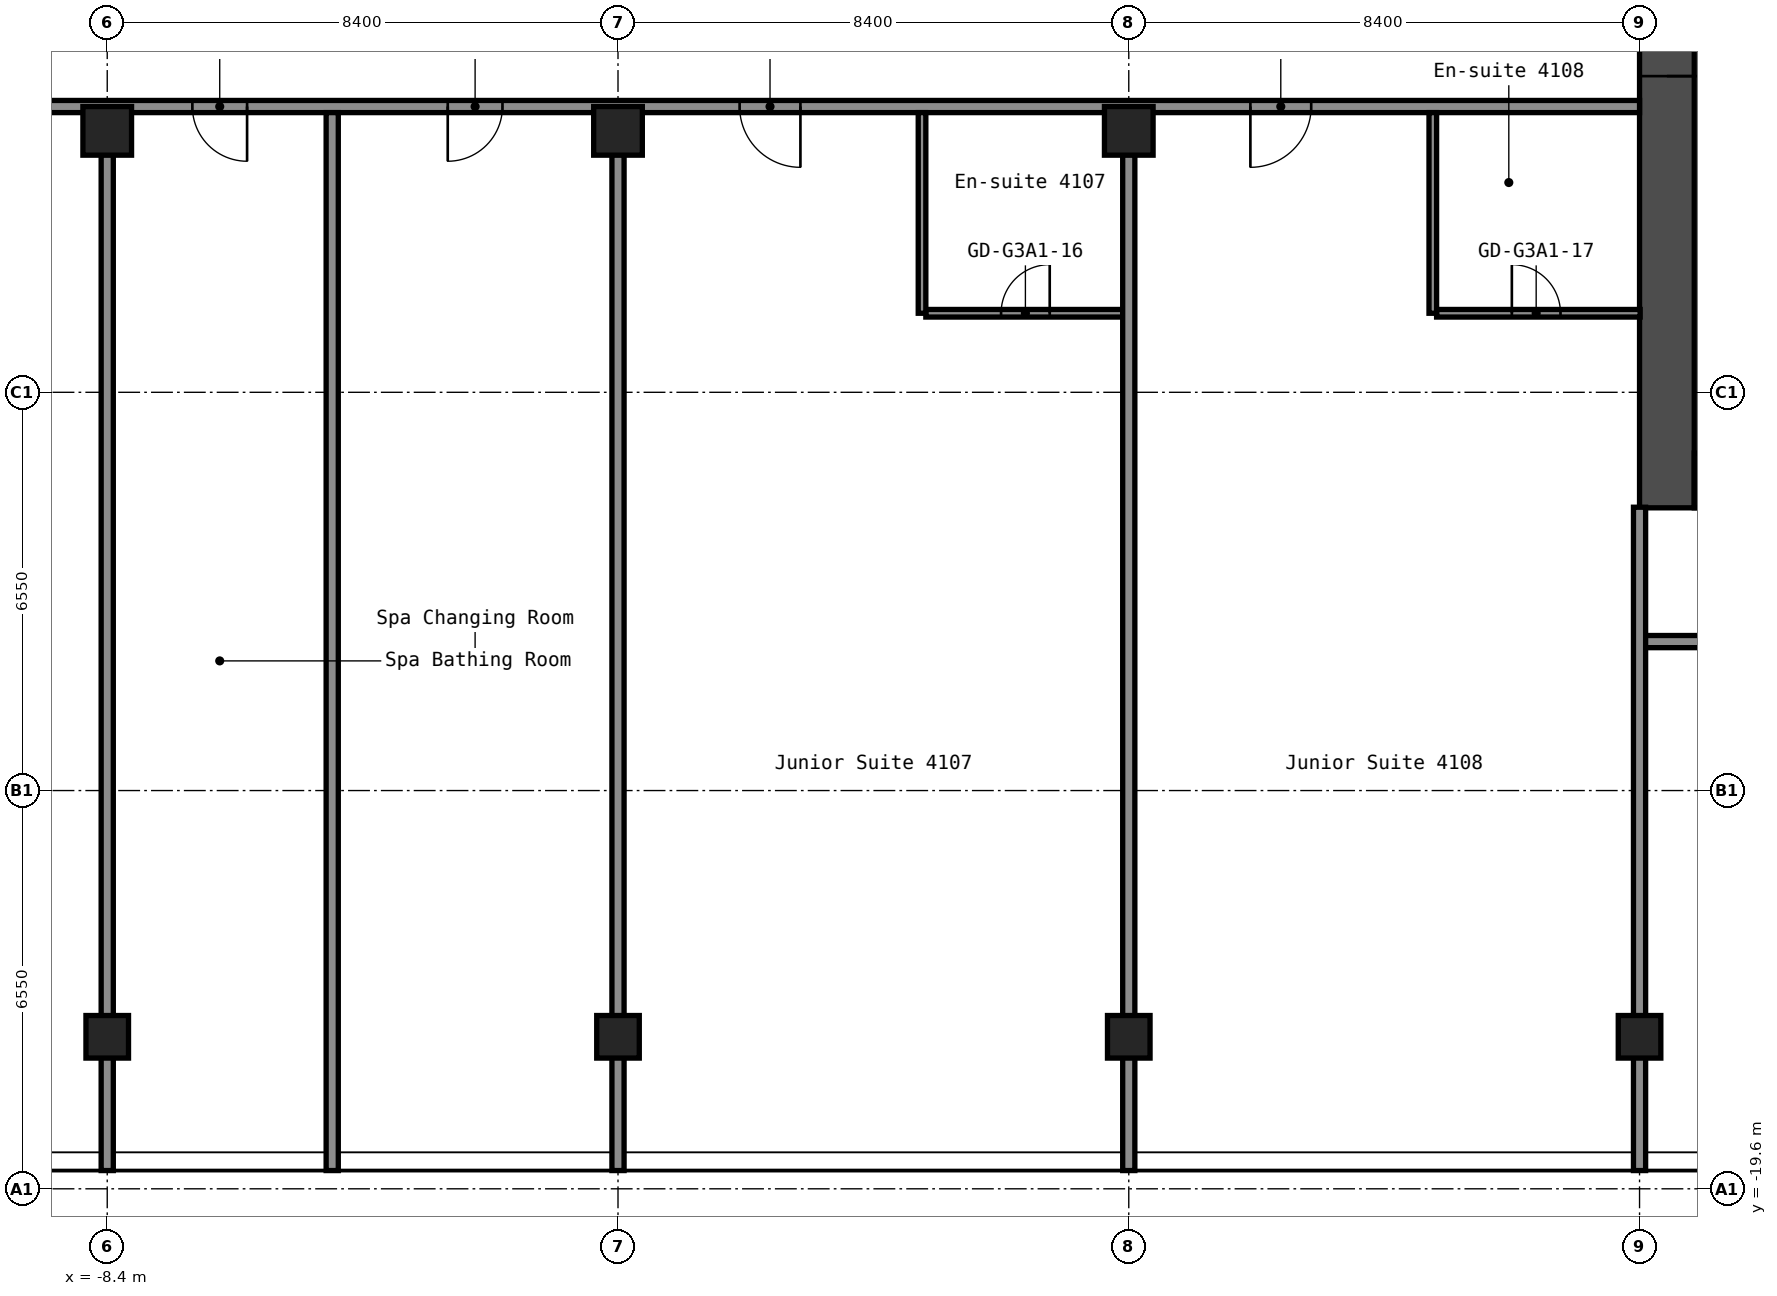
"""IFC4 building model, lengths in metres.
Left out: names, types, materials, properties, quantities, classifications, styles, units other than length and angle.
Written with IfcOpenShell. Run it as: python <this file> out.ifc"""

import sys

from ifc_helpers import new_model, si_unit, direction, frame, frame_2d, origin, origin_2d, place, context, subcontext, project, spatial, rectangle, hollow_rectangle, extrude, element, fill, save


model = new_model("IFC4")
c1 = context("Model", 3, precision=1e-05, world=origin(), true_north=direction((0.0, 1.0)))
c2 = subcontext(c1, "Body", "Model", "MODEL_VIEW")
j1 = project(units=[si_unit("LENGTHUNIT", "METRE"), si_unit("PLANEANGLEUNIT", "RADIAN")], contexts=[c1])
p1 = place(None, origin())
s1 = spatial("IfcSite", under=j1, at=p1, CompositionType="ELEMENT")
p2 = place(p1, origin())
s2 = spatial("IfcBuilding", under=s1, at=p2, CompositionType="ELEMENT")
p3 = place(p2, frame((0.0, 0.0, 147.0)))
s3 = spatial("IfcBuildingStorey", under=s2, at=p3, CompositionType="ELEMENT", Elevation=147.0)
p4 = place(p3, frame((-8.4, -17.1, 0.0), z_axis=(0.0, 0.0, 1.0), x_axis=(1.0, 0.0, 0.0)))
e1 = element("IfcColumn", 1, at=p4, inside=s3, PredefinedType="COLUMN", context=c2, shape_type="SweptSolid", body=[
    extrude(hollow_rectangle(XDim=0.7, YDim=0.7, WallThickness=0.028, at=origin_2d()), origin(), (0.0, 0.0, 1.0), 2.75),
])
p5 = place(p3, frame((-8.4, -2.2, 0.0), z_axis=(0.0, 0.0, 1.0), x_axis=(1.0, 0.0, 0.0)))
e2 = element("IfcColumn", 2, at=p5, inside=s3, PredefinedType="COLUMN", context=c2, shape_type="SweptSolid", body=[
    extrude(hollow_rectangle(XDim=0.8, YDim=0.8, WallThickness=0.032, at=origin_2d()), origin(), (0.0, 0.0, 1.0), 2.75),
])
p6 = place(p3, frame((0.0, -17.1, 0.0), z_axis=(0.0, 0.0, 1.0), x_axis=(1.0, 0.0, 0.0)))
e3 = element("IfcColumn", 3, at=p6, inside=s3, PredefinedType="COLUMN", context=c2, shape_type="SweptSolid", body=[
    extrude(hollow_rectangle(XDim=0.7, YDim=0.7, WallThickness=0.028, at=origin_2d()), origin(), (0.0, 0.0, 1.0), 2.75),
])
p7 = place(p3, frame((0.0, -2.2, 0.0), z_axis=(0.0, 0.0, 1.0), x_axis=(1.0, 0.0, 0.0)))
e4 = element("IfcColumn", 4, at=p7, inside=s3, PredefinedType="COLUMN", context=c2, shape_type="SweptSolid", body=[
    extrude(hollow_rectangle(XDim=0.8, YDim=0.8, WallThickness=0.032, at=origin_2d()), origin(), (0.0, 0.0, 1.0), 2.75),
])
p8 = place(p3, frame((8.4, -17.1, 0.0), z_axis=(0.0, 0.0, 1.0), x_axis=(1.0, 0.0, 0.0)))
e5 = element("IfcColumn", 5, at=p8, inside=s3, PredefinedType="COLUMN", context=c2, shape_type="SweptSolid", body=[
    extrude(hollow_rectangle(XDim=0.7, YDim=0.7, WallThickness=0.028, at=origin_2d()), origin(), (0.0, 0.0, 1.0), 2.75),
])
p9 = place(p3, frame((8.4, -2.2, 0.0), z_axis=(0.0, 0.0, 1.0), x_axis=(1.0, 0.0, 0.0)))
e6 = element("IfcColumn", 6, at=p9, inside=s3, PredefinedType="COLUMN", context=c2, shape_type="SweptSolid", body=[
    extrude(hollow_rectangle(XDim=0.8, YDim=0.8, WallThickness=0.032, at=origin_2d()), origin(), (0.0, 0.0, 1.0), 2.75),
])
p10 = place(p3, frame((16.8, -17.1, 0.0), z_axis=(0.0, 0.0, 1.0), x_axis=(1.0, 0.0, 0.0)))
e7 = element("IfcColumn", 7, at=p10, inside=s3, PredefinedType="COLUMN", context=c2, shape_type="SweptSolid", body=[
    extrude(hollow_rectangle(XDim=0.7, YDim=0.7, WallThickness=0.028, at=origin_2d()), origin(), (0.0, 0.0, 1.0), 2.75),
])
p11 = place(p3, frame((17.25, -8.4, 0.0), z_axis=(0.0, 0.0, 1.0), x_axis=(0.0, 1.0, 0.0)))
e8 = element("IfcWall", 8, at=p11, inside=s3, PredefinedType="SHEAR", context=c2, shape_type="SweptSolid", body=[
    extrude(rectangle(XDim=16.8, YDim=0.9, at=frame_2d((8.4, 0.0))), origin(), (0.0, 0.0, 1.0), 2.75),
])
p12 = place(p11, frame((7.1, 0.0, 0.0)))
e9 = element("IfcOpeningElement", 9, at=p12, cuts=e8, PredefinedType="OPENING", context=c2, shape_type="SweptSolid", body=[
    extrude(rectangle(XDim=1.6, YDim=2.1, at=frame_2d((0.8, 1.05))), frame((0.0, 0.46, 0.0), z_axis=(0.0, -1.0, 0.0), x_axis=(1.0, 0.0, 0.0)), (0.0, 0.0, 1.0), 0.92),
])
p13 = place(p3, frame((17.7, -7.95, 0.0), z_axis=(0.0, 0.0, 1.0), x_axis=(1.0, 0.0, 0.0)))
e10 = element("IfcWall", 10, at=p13, inside=s3, PredefinedType="SHEAR", context=c2, shape_type="SweptSolid", body=[
    extrude(rectangle(XDim=15.0, YDim=0.9, at=frame_2d((7.5, 0.0))), origin(), (0.0, 0.0, 1.0), 2.75),
])
p14 = place(p13, frame((2.55, 0.0, 0.0)))
e11 = element("IfcOpeningElement", 11, at=p14, cuts=e10, PredefinedType="OPENING", context=c2, shape_type="SweptSolid", body=[
    extrude(rectangle(XDim=1.0, YDim=2.1, at=frame_2d((0.5, 1.05))), frame((0.0, 0.46, 0.0), z_axis=(0.0, -1.0, 0.0), x_axis=(1.0, 0.0, 0.0)), (0.0, 0.0, 1.0), 0.92),
])
p15 = place(p3, frame((16.8, -10.6, 0.0), z_axis=(0.0, 0.0, 1.0), x_axis=(1.0, 0.0, 0.0)))
e12 = element("IfcWall", 12, at=p15, inside=s3, PredefinedType="PARTITIONING", context=c2, shape_type="SweptSolid", body=[
    extrude(rectangle(XDim=25.9, YDim=0.2, at=frame_2d((12.95, 0.0))), origin(), (0.0, 0.0, 1.0), 2.75),
])
p16 = place(p15, frame((2.0, 0.0, 0.0)))
e13 = element("IfcOpeningElement", 13, at=p16, cuts=e12, PredefinedType="OPENING", context=c2, shape_type="SweptSolid", body=[
    extrude(rectangle(XDim=1.0, YDim=2.1, at=frame_2d((0.5, 1.05))), frame((0.0, 0.11, 0.0), z_axis=(0.0, -1.0, 0.0), x_axis=(1.0, 0.0, 0.0)), (0.0, 0.0, 1.0), 0.22),
])
p17 = place(p15, frame((10.4, 0.0, 0.0)))
e14 = element("IfcOpeningElement", 14, at=p17, cuts=e12, PredefinedType="OPENING", context=c2, shape_type="SweptSolid", body=[
    extrude(rectangle(XDim=1.0, YDim=2.1, at=frame_2d((0.5, 1.05))), frame((0.0, 0.11, 0.0), z_axis=(0.0, -1.0, 0.0), x_axis=(1.0, 0.0, 0.0)), (0.0, 0.0, 1.0), 0.22),
])
p18 = place(p15, frame((22.4, 0.0, 0.0)))
e15 = element("IfcOpeningElement", 15, at=p18, cuts=e12, PredefinedType="OPENING", context=c2, shape_type="SweptSolid", body=[
    extrude(rectangle(XDim=1.0, YDim=2.1, at=frame_2d((0.5, 1.05))), frame((0.0, 0.11, 0.0), z_axis=(0.0, -1.0, 0.0), x_axis=(1.0, 0.0, 0.0)), (0.0, 0.0, 1.0), 0.22),
])
p19 = place(p3, frame((5.062, -5.2, 0.0), z_axis=(0.0, 0.0, 1.0), x_axis=(1.0, 0.0, 0.0)))
e16 = element("IfcWall", 16, at=p19, inside=s3, PredefinedType="PARTITIONING", context=c2, shape_type="SweptSolid", body=[
    extrude(rectangle(XDim=3.238, YDim=0.125, at=frame_2d((1.619, 0.0))), origin(), (0.0, 0.0, 1.0), 2.75),
])
p20 = place(p19, frame((1.238, 0.0, 0.0)))
e17 = element("IfcOpeningElement", 17, at=p20, cuts=e16, PredefinedType="OPENING", context=c2, shape_type="SweptSolid", body=[
    extrude(rectangle(XDim=0.8, YDim=2.1, at=frame_2d((0.4, 1.05))), frame((0.0, 0.073, 0.0), z_axis=(0.0, -1.0, 0.0), x_axis=(1.0, 0.0, 0.0)), (0.0, 0.0, 1.0), 0.145),
])
p21 = place(p3, frame((13.462, -5.2, 0.0), z_axis=(0.0, 0.0, 1.0), x_axis=(1.0, 0.0, 0.0)))
e18 = element("IfcWall", 18, at=p21, inside=s3, PredefinedType="PARTITIONING", context=c2, shape_type="SweptSolid", body=[
    extrude(rectangle(XDim=3.348, YDim=0.125, at=frame_2d((1.674, 0.0))), origin(), (0.0, 0.0, 1.0), 2.75),
])
p22 = place(p21, frame((1.238, 0.0, 0.0)))
e19 = element("IfcOpeningElement", 19, at=p22, cuts=e18, PredefinedType="OPENING", context=c2, shape_type="SweptSolid", body=[
    extrude(rectangle(XDim=0.8, YDim=2.1, at=frame_2d((0.4, 1.05))), frame((0.0, 0.073, 0.0), z_axis=(0.0, -1.0, 0.0), x_axis=(1.0, 0.0, 0.0)), (0.0, 0.0, 1.0), 0.145),
])
p23 = place(p3, frame((-16.8, -1.8, 0.0), z_axis=(0.0, 0.0, 1.0), x_axis=(1.0, 0.0, 0.0)))
e20 = element("IfcWall", 20, at=p23, inside=s3, PredefinedType="PARTITIONING", context=c2, shape_type="SweptSolid", body=[
    extrude(rectangle(XDim=33.6, YDim=0.2, at=frame_2d((16.8, 0.0))), origin(), (0.0, 0.0, 1.0), 2.75),
])
p24 = place(p23, frame((5.5, 0.0, 0.0)))
e21 = element("IfcOpeningElement", 21, at=p24, cuts=e20, PredefinedType="OPENING", context=c2, shape_type="SweptSolid", body=[
    extrude(rectangle(XDim=1.0, YDim=2.1, at=frame_2d((0.5, 1.05))), frame((0.0, 0.11, 0.0), z_axis=(0.0, -1.0, 0.0), x_axis=(1.0, 0.0, 0.0)), (0.0, 0.0, 1.0), 0.22),
])
p25 = place(p23, frame((9.8, 0.0, 0.0)))
e22 = element("IfcOpeningElement", 22, at=p25, cuts=e20, PredefinedType="OPENING", context=c2, shape_type="SweptSolid", body=[
    extrude(rectangle(XDim=0.9, YDim=2.1, at=frame_2d((0.45, 1.05))), frame((0.0, 0.11, 0.0), z_axis=(0.0, -1.0, 0.0), x_axis=(1.0, 0.0, 0.0)), (0.0, 0.0, 1.0), 0.22),
])
p26 = place(p23, frame((14.0, 0.0, 0.0)))
e23 = element("IfcOpeningElement", 23, at=p26, cuts=e20, PredefinedType="OPENING", context=c2, shape_type="SweptSolid", body=[
    extrude(rectangle(XDim=0.9, YDim=2.1, at=frame_2d((0.45, 1.05))), frame((0.0, 0.11, 0.0), z_axis=(0.0, -1.0, 0.0), x_axis=(1.0, 0.0, 0.0)), (0.0, 0.0, 1.0), 0.22),
])
p27 = place(p23, frame((18.8, 0.0, 0.0)))
e24 = element("IfcOpeningElement", 24, at=p27, cuts=e20, PredefinedType="OPENING", context=c2, shape_type="SweptSolid", body=[
    extrude(rectangle(XDim=1.0, YDim=2.1, at=frame_2d((0.5, 1.05))), frame((0.0, 0.11, 0.0), z_axis=(0.0, -1.0, 0.0), x_axis=(1.0, 0.0, 0.0)), (0.0, 0.0, 1.0), 0.22),
])
p28 = place(p23, frame((27.2, 0.0, 0.0)))
e25 = element("IfcOpeningElement", 25, at=p28, cuts=e20, PredefinedType="OPENING", context=c2, shape_type="SweptSolid", body=[
    extrude(rectangle(XDim=1.0, YDim=2.1, at=frame_2d((0.5, 1.05))), frame((0.0, 0.11, 0.0), z_axis=(0.0, -1.0, 0.0), x_axis=(1.0, 0.0, 0.0)), (0.0, 0.0, 1.0), 0.22),
])
p29 = place(p3, frame((-8.4, -19.3, 0.0), z_axis=(0.0, 0.0, 1.0), x_axis=(0.0, 1.0, 0.0)))
e26 = element("IfcWall", 26, at=p29, inside=s3, PredefinedType="PARTITIONING", context=c2, shape_type="SweptSolid", body=[
    extrude(rectangle(XDim=16.71, YDim=0.2, at=frame_2d((8.355, 0.0))), origin(), (0.0, 0.0, 1.0), 2.75),
])
p30 = place(p3, frame((-4.7, -19.3, 0.0), z_axis=(0.0, 0.0, 1.0), x_axis=(0.0, 1.0, 0.0)))
e27 = element("IfcWall", 27, at=p30, inside=s3, PredefinedType="PARTITIONING", context=c2, shape_type="SweptSolid", body=[
    extrude(rectangle(XDim=17.4, YDim=0.2, at=frame_2d((8.7, 0.0))), origin(), (0.0, 0.0, 1.0), 2.75),
])
p31 = place(p3, frame((0.0, -19.3, 0.0), z_axis=(0.0, 0.0, 1.0), x_axis=(0.0, 1.0, 0.0)))
e28 = element("IfcWall", 28, at=p31, inside=s3, PredefinedType="PARTITIONING", context=c2, shape_type="SweptSolid", body=[
    extrude(rectangle(XDim=16.71, YDim=0.2, at=frame_2d((8.355, 0.0))), origin(), (0.0, 0.0, 1.0), 2.75),
])
p32 = place(p3, frame((5.0, -5.2, 0.0), z_axis=(0.0, 0.0, 1.0), x_axis=(0.0, 1.0, 0.0)))
e29 = element("IfcWall", 29, at=p32, inside=s3, PredefinedType="PARTITIONING", context=c2, shape_type="SweptSolid", body=[
    extrude(rectangle(XDim=3.3, YDim=0.125, at=frame_2d((1.65, 0.0))), origin(), (0.0, 0.0, 1.0), 2.75),
])
p33 = place(p3, frame((8.4, -19.3, 0.0), z_axis=(0.0, 0.0, 1.0), x_axis=(0.0, 1.0, 0.0)))
e30 = element("IfcWall", 30, at=p33, inside=s3, PredefinedType="PARTITIONING", context=c2, shape_type="SweptSolid", body=[
    extrude(rectangle(XDim=16.71, YDim=0.2, at=frame_2d((8.355, 0.0))), origin(), (0.0, 0.0, 1.0), 2.75),
])
p34 = place(p3, frame((13.4, -5.2, 0.0), z_axis=(0.0, 0.0, 1.0), x_axis=(0.0, 1.0, 0.0)))
e31 = element("IfcWall", 31, at=p34, inside=s3, PredefinedType="PARTITIONING", context=c2, shape_type="SweptSolid", body=[
    extrude(rectangle(XDim=3.3, YDim=0.125, at=frame_2d((1.65, 0.0))), origin(), (0.0, 0.0, 1.0), 2.75),
])
p35 = place(p3, frame((16.8, -19.3, 0.0), z_axis=(0.0, 0.0, 1.0), x_axis=(0.0, 1.0, 0.0)))
e32 = element("IfcWall", 32, at=p35, inside=s3, PredefinedType="PARTITIONING", context=c2, shape_type="SweptSolid", body=[
    extrude(rectangle(XDim=10.91, YDim=0.2, at=frame_2d((5.455, 0.0))), origin(), (0.0, 0.0, 1.0), 2.75),
])
p36 = place(p12, origin())
e33 = element("IfcDoor", 33, at=p36, inside=s3, OperationType="DOUBLE_DOOR_SINGLE_SWING", PredefinedType="DOOR", context=c2, shape_type="SweptSolid", body=[
    extrude(rectangle(XDim=1.6, YDim=2.1, at=frame_2d((0.8, 1.05))), frame((0.0, 0.025, 0.0), z_axis=(0.0, -1.0, 0.0), x_axis=(1.0, 0.0, 0.0)), (0.0, 0.0, 1.0), 0.05),
])
fill(e9, e33)
p37 = place(p20, origin())
e34 = element("IfcDoor", 34, at=p37, inside=s3, OperationType="SINGLE_SWING_LEFT", PredefinedType="DOOR", context=c2, shape_type="SweptSolid", body=[
    extrude(rectangle(XDim=0.8, YDim=2.1, at=frame_2d((0.4, 1.05))), frame((0.0, 0.025, 0.0), z_axis=(0.0, -1.0, 0.0), x_axis=(1.0, 0.0, 0.0)), (0.0, 0.0, 1.0), 0.05),
])
fill(e17, e34)
p38 = place(p22, origin())
e35 = element("IfcDoor", 35, at=p38, inside=s3, OperationType="SINGLE_SWING_RIGHT", PredefinedType="DOOR", context=c2, shape_type="SweptSolid", body=[
    extrude(rectangle(XDim=0.8, YDim=2.1, at=frame_2d((0.4, 1.05))), frame((0.0, 0.025, 0.0), z_axis=(0.0, -1.0, 0.0), x_axis=(1.0, 0.0, 0.0)), (0.0, 0.0, 1.0), 0.05),
])
fill(e19, e35)
p39 = place(p25, origin())
e36 = element("IfcDoor", 36, at=p39, inside=s3, OperationType="SINGLE_SWING_RIGHT", PredefinedType="DOOR", context=c2, shape_type="SweptSolid", body=[
    extrude(rectangle(XDim=0.9, YDim=2.1, at=frame_2d((0.45, 1.05))), frame((0.0, 0.025, 0.0), z_axis=(0.0, -1.0, 0.0), x_axis=(1.0, 0.0, 0.0)), (0.0, 0.0, 1.0), 0.05),
])
fill(e22, e36)
p40 = place(p26, origin())
e37 = element("IfcDoor", 37, at=p40, inside=s3, OperationType="SINGLE_SWING_LEFT", PredefinedType="DOOR", context=c2, shape_type="SweptSolid", body=[
    extrude(rectangle(XDim=0.9, YDim=2.1, at=frame_2d((0.45, 1.05))), frame((0.0, 0.025, 0.0), z_axis=(0.0, -1.0, 0.0), x_axis=(1.0, 0.0, 0.0)), (0.0, 0.0, 1.0), 0.05),
])
fill(e23, e37)
p41 = place(p27, origin())
e38 = element("IfcDoor", 38, at=p41, inside=s3, OperationType="SINGLE_SWING_RIGHT", PredefinedType="DOOR", context=c2, shape_type="SweptSolid", body=[
    extrude(rectangle(XDim=1.0, YDim=2.1, at=frame_2d((0.5, 1.05))), frame((0.0, 0.025, 0.0), z_axis=(0.0, -1.0, 0.0), x_axis=(1.0, 0.0, 0.0)), (0.0, 0.0, 1.0), 0.05),
])
fill(e24, e38)
p42 = place(p28, origin())
e39 = element("IfcDoor", 39, at=p42, inside=s3, OperationType="SINGLE_SWING_LEFT", PredefinedType="DOOR", context=c2, shape_type="SweptSolid", body=[
    extrude(rectangle(XDim=1.0, YDim=2.1, at=frame_2d((0.5, 1.05))), frame((0.0, 0.025, 0.0), z_axis=(0.0, -1.0, 0.0), x_axis=(1.0, 0.0, 0.0)), (0.0, 0.0, 1.0), 0.05),
])
fill(e25, e39)
save(model, sys.argv[1])
